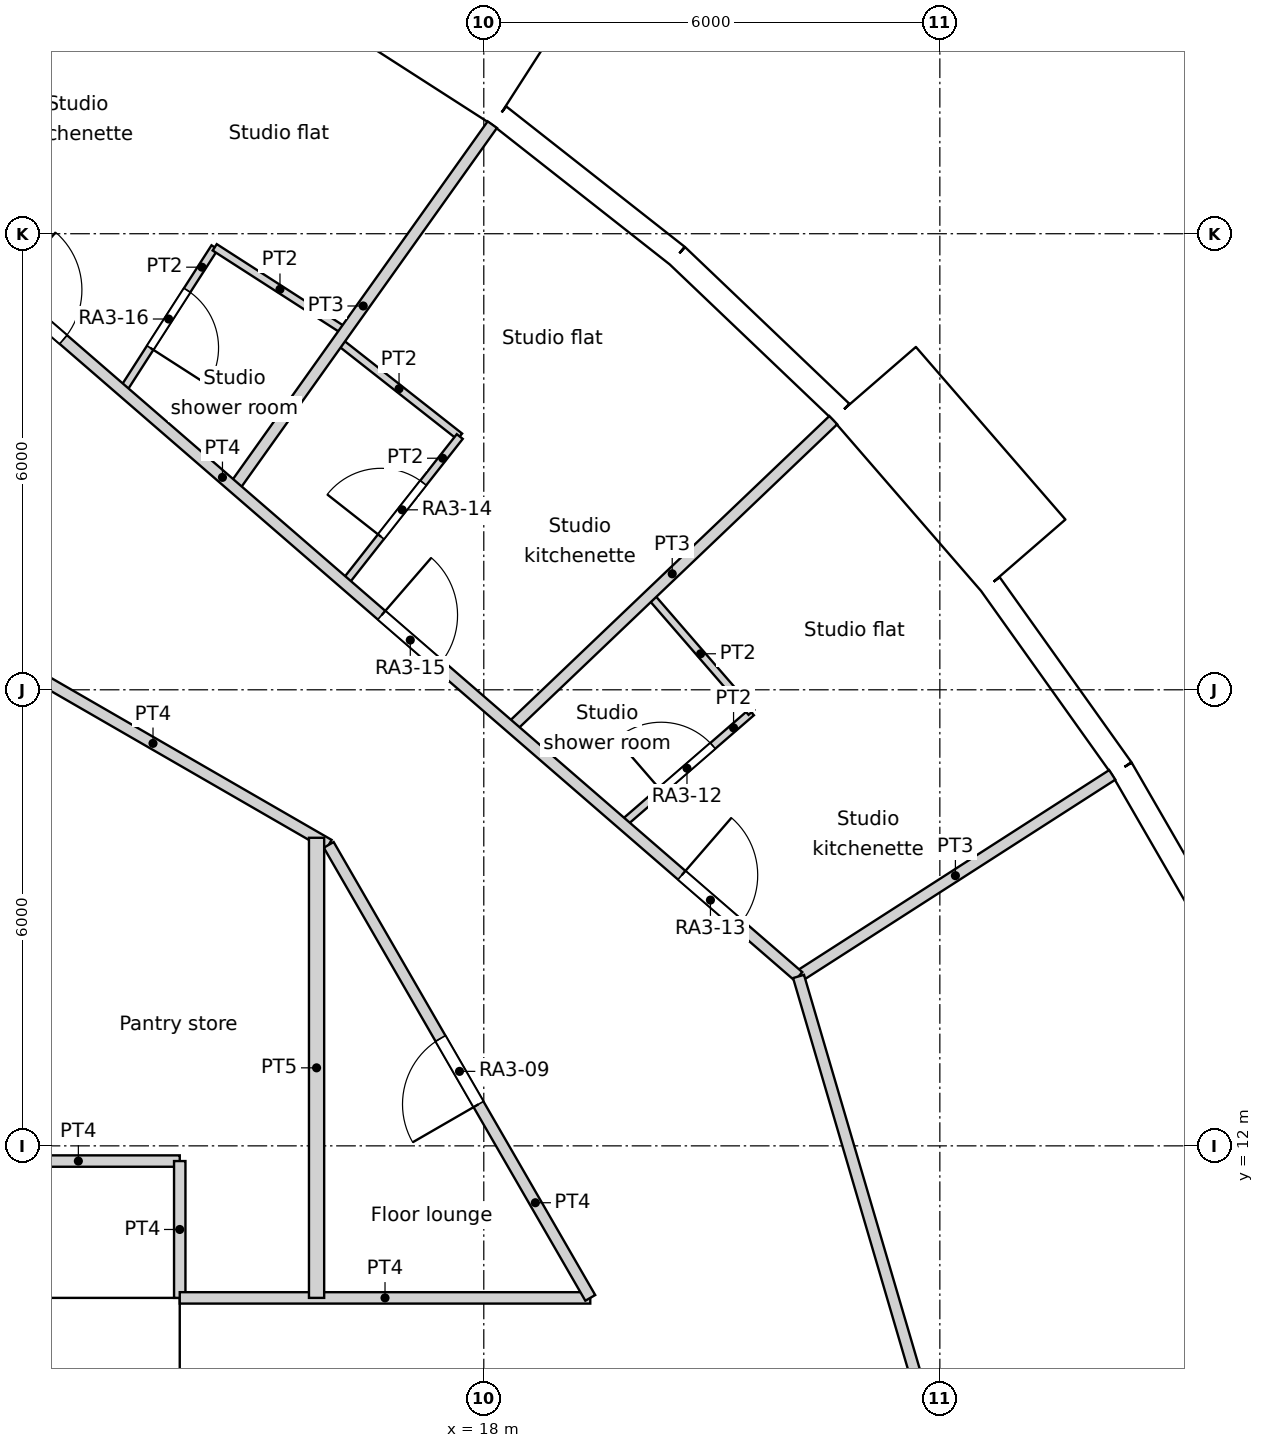
"""IFC4 building model, lengths in metres.
Left out: names, types, materials, properties, quantities, classifications, styles, units other than length and angle.
Written with IfcOpenShell. Run it as: python <this file> out.ifc"""

import sys

from ifc_helpers import new_model, si_unit, direction, frame, frame_2d, origin, origin_2d, place, context, subcontext, project, spatial, rectangle, circle, extrude, element, fill, save


model = new_model("IFC4")
c1 = context("Model", 3, precision=1e-05, world=origin(), true_north=direction((0.0, 1.0)))
c2 = subcontext(c1, "Body", "Model", "MODEL_VIEW")
j1 = project(units=[si_unit("LENGTHUNIT", "METRE"), si_unit("PLANEANGLEUNIT", "RADIAN")], contexts=[c1])
p1 = place(None, origin())
s1 = spatial("IfcSite", under=j1, at=p1, CompositionType="ELEMENT")
p2 = place(p1, origin())
s2 = spatial("IfcBuilding", under=s1, at=p2, CompositionType="ELEMENT")
p3 = place(p2, frame((0.0, 0.0, 49.8)))
s3 = spatial("IfcBuildingStorey", under=s2, at=p3, CompositionType="ELEMENT", Elevation=49.8)
for number, where, z_axis, x_axis in (
    (1, (25.469, 16.368, 0.0), (0.0, 0.0, 1.0), (1.0, 0.0, 0.0)),
    (2, (21.911, 20.892, 0.0), (0.0, 0.0, 1.0), (1.0, 0.0, 0.0)),
    (3, (17.561, 24.661, 0.0), (0.0, 0.0, 1.0), (1.0, 0.0, 0.0)),
):
    element("IfcColumn", number, at=place(p3, frame(where, z_axis=z_axis, x_axis=x_axis)), inside=s3, PredefinedType="COLUMN", context=c2, shape_type="SweptSolid", body=[
        extrude(circle(Radius=0.7, at=origin_2d()), origin(), (0.0, 0.0, 1.0), 3.6),
    ])
for number, where, z_axis, x_axis in (
    (4, (21.937, 11.017, 0.0), (0.0, 0.0, 1.0), (1.0, 0.0, 0.0)),
    (5, (18.805, 15.779, 0.0), (0.0, 0.0, 1.0), (1.0, 0.0, 0.0)),
    (6, (14.659, 19.69, 0.0), (0.0, 0.0, 1.0), (1.0, 0.0, 0.0)),
):
    element("IfcColumn", number, at=place(p3, frame(where, z_axis=z_axis, x_axis=x_axis)), inside=s3, PredefinedType="COLUMN", context=c2, shape_type="SweptSolid", body=[
        extrude(circle(Radius=0.75, at=origin_2d()), origin(), (0.0, 0.0, 1.0), 3.6),
    ])
for number, where, z_axis, x_axis in (
    (7, (15.552, 10.603, 0.0), (0.0, 0.0, 1.0), (1.0, 0.0, 0.0)),
    (8, (11.735, 14.716, 0.0), (0.0, 0.0, 1.0), (1.0, 0.0, 0.0)),
):
    element("IfcColumn", number, at=place(p3, frame(where, z_axis=z_axis, x_axis=x_axis)), inside=s3, PredefinedType="COLUMN", context=c2, shape_type="SweptSolid", body=[
        extrude(circle(Radius=0.8, at=origin_2d()), origin(), (0.0, 0.0, 1.0), 3.6),
    ])
p4 = place(p3, frame((27.884, 14.382, 0.0), z_axis=(0.0, 0.0, 1.0), x_axis=(-0.500025049464, 0.866010940986, 0.0)))
e9 = element("IfcWall", 9, at=p4, inside=s3, PredefinedType="SOLIDWALL", context=c2, shape_type="SweptSolid", body=[
    extrude(rectangle(XDim=2.98, YDim=0.3, at=frame_2d((1.49, 0.0))), origin(), (0.0, 0.0, 1.0), 3.15),
])
p5 = place(p4, frame((1.49, 0.0, 1.55)))
e10 = element("IfcOpeningElement", 10, at=p5, cuts=e9, PredefinedType="OPENING", context=c2, shape_type="SweptSolid", body=[
    extrude(circle(Radius=0.9, at=origin_2d()), frame((0.0, 0.16, 0.0), z_axis=(0.0, -1.0, 0.0), x_axis=(1.0, 0.0, 0.0)), (0.0, 0.0, 1.0), 0.32),
])
p6 = place(p3, frame((26.394, 16.962, 0.0), z_axis=(0.0, 0.0, 1.0), x_axis=(-0.580059407678, 0.81457417315, 0.0)))
e11 = element("IfcWall", 11, at=p6, inside=s3, PredefinedType="SOLIDWALL", context=c2, shape_type="SweptSolid", body=[
    extrude(rectangle(XDim=2.979, YDim=0.3, at=frame_2d((1.49, 0.0))), origin(), (0.0, 0.0, 1.0), 3.15),
])
p7 = place(p6, frame((1.49, 0.0, 1.55)))
e12 = element("IfcOpeningElement", 12, at=p7, cuts=e11, PredefinedType="OPENING", context=c2, shape_type="SweptSolid", body=[
    extrude(circle(Radius=0.9, at=origin_2d()), frame((0.0, 0.16, 0.0), z_axis=(0.0, -1.0, 0.0), x_axis=(1.0, 0.0, 0.0)), (0.0, 0.0, 1.0), 0.32),
])
p8 = place(p3, frame((25.101, 19.766, -0.45), z_axis=(0.0, 0.0, 1.0), x_axis=(-0.654890259022, 0.75572398972, 0.0)))
e13 = element("IfcWall", 13, at=p8, inside=s3, PredefinedType="ELEMENTEDWALL", context=c2, shape_type="SweptSolid", body=[
    extrude(rectangle(XDim=3.0, YDim=1.45, at=frame_2d((1.5, 0.0))), origin(), (0.0, 0.0, 1.0), 3.6),
])
p9 = place(p8, frame((1.5, 0.0, 2.0)))
e14 = element("IfcOpeningElement", 14, at=p9, cuts=e13, PredefinedType="OPENING", context=c2, shape_type="SweptSolid", body=[
    extrude(circle(Radius=0.9, at=origin_2d()), frame((0.0, 0.735, 0.0), z_axis=(0.0, -1.0, 0.0), x_axis=(1.0, 0.0, 0.0)), (0.0, 0.0, 1.0), 1.47),
])
p10 = place(p3, frame((22.702, 21.655, 0.0), z_axis=(0.0, 0.0, 1.0), x_axis=(-0.723744206617, 0.690068346896, 0.0)))
e15 = element("IfcWall", 15, at=p10, inside=s3, PredefinedType="SOLIDWALL", context=c2, shape_type="SweptSolid", body=[
    extrude(rectangle(XDim=2.98, YDim=0.3, at=frame_2d((1.49, 0.0))), origin(), (0.0, 0.0, 1.0), 3.15),
])
p11 = place(p10, frame((1.49, 0.0, 1.55)))
e16 = element("IfcOpeningElement", 16, at=p11, cuts=e15, PredefinedType="OPENING", context=c2, shape_type="SweptSolid", body=[
    extrude(circle(Radius=0.9, at=origin_2d()), frame((0.0, 0.16, 0.0), z_axis=(0.0, -1.0, 0.0), x_axis=(1.0, 0.0, 0.0)), (0.0, 0.0, 1.0), 0.32),
])
p12 = place(p3, frame((20.546, 23.711, 0.0), z_axis=(0.0, 0.0, 1.0), x_axis=(-0.786045331304, 0.618168858108, 0.0)))
e17 = element("IfcWall", 17, at=p12, inside=s3, PredefinedType="SOLIDWALL", context=c2, shape_type="SweptSolid", body=[
    extrude(rectangle(XDim=2.98, YDim=0.3, at=frame_2d((1.49, 0.0))), origin(), (0.0, 0.0, 1.0), 3.15),
])
p13 = place(p12, frame((1.49, 0.0, 1.55)))
e18 = element("IfcOpeningElement", 18, at=p13, cuts=e17, PredefinedType="OPENING", context=c2, shape_type="SweptSolid", body=[
    extrude(circle(Radius=0.9, at=origin_2d()), frame((0.0, 0.16, 0.0), z_axis=(0.0, -1.0, 0.0), x_axis=(1.0, 0.0, 0.0)), (0.0, 0.0, 1.0), 0.32),
])
p14 = place(p3, frame((18.516, 26.037, -0.45), z_axis=(0.0, 0.0, 1.0), x_axis=(-0.841223422347, 0.540687667415, 0.0)))
e19 = element("IfcWall", 19, at=p14, inside=s3, PredefinedType="ELEMENTEDWALL", context=c2, shape_type="SweptSolid", body=[
    extrude(rectangle(XDim=3.0, YDim=1.45, at=frame_2d((1.5, 0.0))), origin(), (0.0, 0.0, 1.0), 3.6),
])
p15 = place(p14, frame((1.5, 0.0, 2.0)))
e20 = element("IfcOpeningElement", 20, at=p15, cuts=e19, PredefinedType="OPENING", context=c2, shape_type="SweptSolid", body=[
    extrude(circle(Radius=0.9, at=origin_2d()), frame((0.0, 0.735, 0.0), z_axis=(0.0, -1.0, 0.0), x_axis=(1.0, 0.0, 0.0)), (0.0, 0.0, 1.0), 1.47),
])
p16 = place(p3, frame((-14.0, 9.4, 0.0), z_axis=(0.0, 0.0, 1.0), x_axis=(1.0, 0.0, 0.0)))
e21 = element("IfcWall", 21, at=p16, inside=s3, PredefinedType="SOLIDWALL", context=c2, shape_type="SweptSolid", body=[
    extrude(rectangle(XDim=28.0, YDim=1.2, at=frame_2d((14.0, 0.0))), origin(), (0.0, 0.0, 1.0), 3.6),
])
p17 = place(p16, frame((9.8, 0.0, 0.0)))
e22 = element("IfcOpeningElement", 22, at=p17, cuts=e21, PredefinedType="OPENING", context=c2, shape_type="SweptSolid", body=[
    extrude(rectangle(XDim=1.8, YDim=2.1, at=frame_2d((0.9, 1.05))), frame((0.0, 0.6, 0.0), z_axis=(0.0, -1.0, 0.0), x_axis=(1.0, 0.0, 0.0)), (0.0, 0.0, 1.0), 1.2),
])
p18 = place(p3, frame((11.332, 11.8, 0.0), z_axis=(0.0, 0.0, 1.0), x_axis=(1.0, 0.0, 0.0)))
e23 = element("IfcWall", 23, at=p18, inside=s3, PredefinedType="PARTITIONING", context=c2, shape_type="SweptSolid", body=[
    extrude(rectangle(XDim=2.668, YDim=0.15, at=frame_2d((1.334, 0.0))), origin(), (0.0, 0.0, 1.0), 3.15),
])
p19 = place(p3, frame((14.0, 10.0, 0.0), z_axis=(0.0, 0.0, 1.0), x_axis=(0.0, 1.0, 0.0)))
e24 = element("IfcWall", 24, at=p19, inside=s3, PredefinedType="PARTITIONING", context=c2, shape_type="SweptSolid", body=[
    extrude(rectangle(XDim=1.8, YDim=0.15, at=frame_2d((0.9, 0.0))), origin(), (0.0, 0.0, 1.0), 3.15),
])
p20 = place(p3, frame((14.0, 10.0, 0.0), z_axis=(0.0, 0.0, 1.0), x_axis=(1.0, 0.0, 0.0)))
e25 = element("IfcWall", 25, at=p20, inside=s3, PredefinedType="PARTITIONING", context=c2, shape_type="SweptSolid", body=[
    extrude(rectangle(XDim=5.401, YDim=0.15, at=frame_2d((2.7, 0.0))), origin(), (0.0, 0.0, 1.0), 3.15),
])
p21 = place(p3, frame((15.96, 15.96, 0.0), z_axis=(0.0, 0.0, 1.0), x_axis=(0.499992689227, -0.86602962462, 0.0)))
e26 = element("IfcWall", 26, at=p21, inside=s3, PredefinedType="PARTITIONING", context=c2, shape_type="SweptSolid", body=[
    extrude(rectangle(XDim=6.882, YDim=0.15, at=frame_2d((3.441, 0.0))), origin(), (0.0, 0.0, 1.0), 3.15),
])
p22 = place(p21, frame((2.941, 0.0, 0.0)))
e27 = element("IfcOpeningElement", 27, at=p22, cuts=e26, PredefinedType="OPENING", context=c2, shape_type="SweptSolid", body=[
    extrude(rectangle(XDim=1.0, YDim=2.04, at=frame_2d((0.5, 1.02))), frame((0.0, 0.075, 0.0), z_axis=(0.0, -1.0, 0.0), x_axis=(1.0, 0.0, 0.0)), (0.0, 0.0, 1.0), 0.15),
])
p23 = place(p3, frame((22.141, 14.229, 0.0), z_axis=(0.0, 0.0, 1.0), x_axis=(0.281730446162, -0.959493593363, 0.0)))
e28 = element("IfcWall", 28, at=p23, inside=s3, PredefinedType="PARTITIONING", context=c2, shape_type="SweptSolid", body=[
    extrude(rectangle(XDim=14.83, YDim=0.15, at=frame_2d((7.415, 0.0))), origin(), (0.0, 0.0, 1.0), 3.15),
])
p24 = place(p23, frame((5.715, 0.0, 0.0)))
e29 = element("IfcOpeningElement", 29, at=p24, cuts=e28, PredefinedType="OPENING", context=c2, shape_type="SweptSolid", body=[
    extrude(rectangle(XDim=1.8, YDim=2.1, at=frame_2d((0.9, 1.05))), frame((0.0, 0.075, 0.0), z_axis=(0.0, -1.0, 0.0), x_axis=(1.0, 0.0, 0.0)), (0.0, 0.0, 1.0), 0.15),
])
p25 = place(p3, frame((10.932, 23.939, 0.0), z_axis=(0.0, 0.0, 1.0), x_axis=(0.755838982892, -0.654757536757, 0.0)))
e30 = element("IfcWall", 30, at=p25, inside=s3, PredefinedType="PARTITIONING", context=c2, shape_type="SweptSolid", body=[
    extrude(rectangle(XDim=14.83, YDim=0.15, at=frame_2d((7.415, 0.0))), origin(), (0.0, 0.0, 1.0), 3.15),
])
p26 = place(p25, frame((12.796, 0.0, 0.0)))
e31 = element("IfcOpeningElement", 31, at=p26, cuts=e30, PredefinedType="OPENING", context=c2, shape_type="SweptSolid", body=[
    extrude(rectangle(XDim=1.0, YDim=2.1, at=frame_2d((0.5, 1.05))), frame((0.0, 0.075, 0.0), z_axis=(0.0, -1.0, 0.0), x_axis=(1.0, 0.0, 0.0)), (0.0, 0.0, 1.0), 0.15),
])
p27 = place(p25, frame((7.572, 0.0, 0.0)))
e32 = element("IfcOpeningElement", 32, at=p27, cuts=e30, PredefinedType="OPENING", context=c2, shape_type="SweptSolid", body=[
    extrude(rectangle(XDim=1.0, YDim=2.1, at=frame_2d((0.5, 1.05))), frame((0.0, 0.075, 0.0), z_axis=(0.0, -1.0, 0.0), x_axis=(1.0, 0.0, 0.0)), (0.0, 0.0, 1.0), 0.15),
])
p28 = place(p25, frame((1.033, 0.0, 0.0)))
e33 = element("IfcOpeningElement", 33, at=p28, cuts=e30, PredefinedType="OPENING", context=c2, shape_type="SweptSolid", body=[
    extrude(rectangle(XDim=1.0, YDim=2.1, at=frame_2d((0.5, 1.05))), frame((0.0, 0.075, 0.0), z_axis=(0.0, -1.0, 0.0), x_axis=(1.0, 0.0, 0.0)), (0.0, 0.0, 1.0), 0.15),
])
p29 = place(p3, frame((11.336, 18.63, 0.0), z_axis=(0.0, 0.0, 1.0), x_axis=(0.866056911224, -0.499945423543, 0.0)))
e34 = element("IfcWall", 34, at=p29, inside=s3, PredefinedType="PARTITIONING", context=c2, shape_type="SweptSolid", body=[
    extrude(rectangle(XDim=5.339, YDim=0.15, at=frame_2d((2.67, 0.0))), origin(), (0.0, 0.0, 1.0), 3.15),
])
p30 = place(p3, frame((15.8, 10.0, 0.0), z_axis=(0.0, 0.0, 1.0), x_axis=(0.0, 1.0, 0.0)))
e35 = element("IfcWall", 35, at=p30, inside=s3, PredefinedType="PARTITIONING", context=c2, shape_type="SweptSolid", body=[
    extrude(rectangle(XDim=6.053, YDim=0.2, at=frame_2d((3.026, 0.0))), origin(), (0.0, 0.0, 1.0), 3.15),
])
p31 = place(p3, frame((22.141, 14.229, 0.0), z_axis=(0.0, 0.0, 1.0), x_axis=(0.841325591791, 0.540528675093, 0.0)))
e36 = element("IfcWall", 36, at=p31, inside=s3, PredefinedType="PARTITIONING", context=c2, shape_type="SweptSolid", body=[
    extrude(rectangle(XDim=4.906, YDim=0.15, at=frame_2d((2.453, 0.0))), origin(), (0.0, 0.0, 1.0), 3.15),
])
p32 = place(p3, frame((19.826, 16.234, 0.0), z_axis=(0.0, 0.0, 1.0), x_axis=(0.755703447798, 0.654913963042, 0.0)))
e37 = element("IfcWall", 37, at=p32, inside=s3, PredefinedType="PARTITIONING", context=c2, shape_type="SweptSolid", body=[
    extrude(rectangle(XDim=2.243, YDim=0.1, at=frame_2d((1.122, 0.0))), origin(), (0.0, 0.0, 1.0), 3.15),
])
p33 = place(p32, frame((0.671, 0.0, 0.0)))
e38 = element("IfcOpeningElement", 38, at=p33, cuts=e37, PredefinedType="OPENING", context=c2, shape_type="SweptSolid", body=[
    extrude(rectangle(XDim=0.9, YDim=2.04, at=frame_2d((0.45, 1.02))), frame((0.0, 0.05, 0.0), z_axis=(0.0, -1.0, 0.0), x_axis=(1.0, 0.0, 0.0)), (0.0, 0.0, 1.0), 0.1),
])
p34 = place(p3, frame((20.184, 19.245, 0.0), z_axis=(0.0, 0.0, 1.0), x_axis=(0.655017058368, -0.755614090159, 0.0)))
e39 = element("IfcWall", 39, at=p34, inside=s3, PredefinedType="PARTITIONING", context=c2, shape_type="SweptSolid", body=[
    extrude(rectangle(XDim=2.041, YDim=0.1, at=frame_2d((1.021, 0.0))), origin(), (0.0, 0.0, 1.0), 3.15),
])
p35 = place(p3, frame((18.36, 17.505, 0.0), z_axis=(0.0, 0.0, 1.0), x_axis=(0.723605349213, 0.690213951315, 0.0)))
e40 = element("IfcWall", 40, at=p35, inside=s3, PredefinedType="PARTITIONING", context=c2, shape_type="SweptSolid", body=[
    extrude(rectangle(XDim=5.856, YDim=0.15, at=frame_2d((2.928, 0.0))), origin(), (0.0, 0.0, 1.0), 3.15),
])
p36 = place(p3, frame((16.168, 19.404, 0.0), z_axis=(0.0, 0.0, 1.0), x_axis=(0.618142414415, 0.786066126672, 0.0)))
e41 = element("IfcWall", 41, at=p36, inside=s3, PredefinedType="PARTITIONING", context=c2, shape_type="SweptSolid", body=[
    extrude(rectangle(XDim=2.453, YDim=0.1, at=frame_2d((1.226, 0.0))), origin(), (0.0, 0.0, 1.0), 3.15),
])
p37 = place(p36, frame((0.776, 0.0, 0.0)))
e42 = element("IfcOpeningElement", 42, at=p37, cuts=e41, PredefinedType="OPENING", context=c2, shape_type="SweptSolid", body=[
    extrude(rectangle(XDim=0.9, YDim=2.04, at=frame_2d((0.45, 1.02))), frame((0.0, 0.05, 0.0), z_axis=(0.0, -1.0, 0.0), x_axis=(1.0, 0.0, 0.0)), (0.0, 0.0, 1.0), 0.1),
])
p38 = place(p3, frame((16.086, 22.589, 0.0), z_axis=(0.0, 0.0, 1.0), x_axis=(0.785984904201, -0.618245687707, 0.0)))
e43 = element("IfcWall", 43, at=p38, inside=s3, PredefinedType="PARTITIONING", context=c2, shape_type="SweptSolid", body=[
    extrude(rectangle(XDim=2.033, YDim=0.1, at=frame_2d((1.017, 0.0))), origin(), (0.0, 0.0, 1.0), 3.15),
])
p39 = place(p3, frame((14.715, 20.664, 0.0), z_axis=(0.0, 0.0, 1.0), x_axis=(0.57995989616, 0.814645026282, 0.0)))
e44 = element("IfcWall", 44, at=p39, inside=s3, PredefinedType="PARTITIONING", context=c2, shape_type="SweptSolid", body=[
    extrude(rectangle(XDim=5.857, YDim=0.15, at=frame_2d((2.928, 0.0))), origin(), (0.0, 0.0, 1.0), 3.15),
])
p40 = place(p3, frame((14.46, 23.821, 0.0), z_axis=(0.0, 0.0, 1.0), x_axis=(0.841135728185, -0.540824081168, 0.0)))
e45 = element("IfcWall", 45, at=p40, inside=s3, PredefinedType="PARTITIONING", context=c2, shape_type="SweptSolid", body=[
    extrude(rectangle(XDim=2.041, YDim=0.1, at=frame_2d((1.021, 0.0))), origin(), (0.0, 0.0, 1.0), 3.15),
])
p41 = place(p3, frame((13.248, 21.935, 0.0), z_axis=(0.0, 0.0, 1.0), x_axis=(0.540597960994, 0.841281073464, 0.0)))
e46 = element("IfcWall", 46, at=p41, inside=s3, PredefinedType="PARTITIONING", context=c2, shape_type="SweptSolid", body=[
    extrude(rectangle(XDim=2.242, YDim=0.1, at=frame_2d((1.121, 0.0))), origin(), (0.0, 0.0, 1.0), 3.15),
])
p42 = place(p41, frame((0.671, 0.0, 0.0)))
e47 = element("IfcOpeningElement", 47, at=p42, cuts=e46, PredefinedType="OPENING", context=c2, shape_type="SweptSolid", body=[
    extrude(rectangle(XDim=0.9, YDim=2.04, at=frame_2d((0.45, 1.02))), frame((0.0, 0.05, 0.0), z_axis=(0.0, -1.0, 0.0), x_axis=(1.0, 0.0, 0.0)), (0.0, 0.0, 1.0), 0.1),
])
p43 = place(p3, frame((10.934, 23.939, 0.0), z_axis=(0.0, 0.0, 1.0), x_axis=(0.415144641481, 0.909755421336, 0.0)))
e48 = element("IfcWall", 48, at=p43, inside=s3, PredefinedType="PARTITIONING", context=c2, shape_type="SweptSolid", body=[
    extrude(rectangle(XDim=4.906, YDim=0.15, at=frame_2d((2.453, 0.0))), origin(), (0.0, 0.0, 1.0), 3.15),
])
p44 = place(p5, origin())
e49 = element("IfcWindow", 49, at=p44, inside=s3, PartitioningType="SINGLE_PANEL", PredefinedType="WINDOW", context=c2, shape_type="SweptSolid", body=[
    extrude(circle(Radius=0.9, at=origin_2d()), frame((0.0, 0.12, 0.0), z_axis=(0.0, -1.0, 0.0), x_axis=(1.0, 0.0, 0.0)), (0.0, 0.0, 1.0), 0.1),
])
fill(e10, e49)
p45 = place(p7, origin())
e50 = element("IfcWindow", 50, at=p45, inside=s3, PartitioningType="SINGLE_PANEL", PredefinedType="WINDOW", context=c2, shape_type="SweptSolid", body=[
    extrude(circle(Radius=0.9, at=origin_2d()), frame((0.0, 0.12, 0.0), z_axis=(0.0, -1.0, 0.0), x_axis=(1.0, 0.0, 0.0)), (0.0, 0.0, 1.0), 0.1),
])
fill(e12, e50)
p46 = place(p9, origin())
e51 = element("IfcWindow", 51, at=p46, inside=s3, PartitioningType="SINGLE_PANEL", PredefinedType="WINDOW", context=c2, shape_type="SweptSolid", body=[
    extrude(circle(Radius=0.9, at=origin_2d()), frame((0.0, 0.695, 0.0), z_axis=(0.0, -1.0, 0.0), x_axis=(1.0, 0.0, 0.0)), (0.0, 0.0, 1.0), 0.1),
])
fill(e14, e51)
p47 = place(p11, origin())
e52 = element("IfcWindow", 52, at=p47, inside=s3, PartitioningType="SINGLE_PANEL", PredefinedType="WINDOW", context=c2, shape_type="SweptSolid", body=[
    extrude(circle(Radius=0.9, at=origin_2d()), frame((0.0, 0.12, 0.0), z_axis=(0.0, -1.0, 0.0), x_axis=(1.0, 0.0, 0.0)), (0.0, 0.0, 1.0), 0.1),
])
fill(e16, e52)
p48 = place(p13, origin())
e53 = element("IfcWindow", 53, at=p48, inside=s3, PartitioningType="SINGLE_PANEL", PredefinedType="WINDOW", context=c2, shape_type="SweptSolid", body=[
    extrude(circle(Radius=0.9, at=origin_2d()), frame((0.0, 0.12, 0.0), z_axis=(0.0, -1.0, 0.0), x_axis=(1.0, 0.0, 0.0)), (0.0, 0.0, 1.0), 0.1),
])
fill(e18, e53)
p49 = place(p15, origin())
e54 = element("IfcWindow", 54, at=p49, inside=s3, PartitioningType="SINGLE_PANEL", PredefinedType="WINDOW", context=c2, shape_type="SweptSolid", body=[
    extrude(circle(Radius=0.9, at=origin_2d()), frame((0.0, 0.695, 0.0), z_axis=(0.0, -1.0, 0.0), x_axis=(1.0, 0.0, 0.0)), (0.0, 0.0, 1.0), 0.1),
])
fill(e20, e54)
p50 = place(p22, origin())
e55 = element("IfcDoor", 55, at=p50, inside=s3, OperationType="SINGLE_SWING_LEFT", PredefinedType="DOOR", context=c2, shape_type="SweptSolid", body=[
    extrude(rectangle(XDim=1.0, YDim=2.04, at=frame_2d((0.5, 1.02))), frame((0.0, 0.025, 0.0), z_axis=(0.0, -1.0, 0.0), x_axis=(1.0, 0.0, 0.0)), (0.0, 0.0, 1.0), 0.05),
])
fill(e27, e55)
p51 = place(p33, origin())
e56 = element("IfcDoor", 56, at=p51, inside=s3, OperationType="SINGLE_SWING_LEFT", PredefinedType="DOOR", context=c2, shape_type="SweptSolid", body=[
    extrude(rectangle(XDim=0.9, YDim=2.04, at=frame_2d((0.45, 1.02))), frame((0.0, 0.025, 0.0), z_axis=(0.0, -1.0, 0.0), x_axis=(1.0, 0.0, 0.0)), (0.0, 0.0, 1.0), 0.05),
])
fill(e38, e56)
p52 = place(p26, origin())
e57 = element("IfcDoor", 57, at=p52, inside=s3, OperationType="SINGLE_SWING_LEFT", PredefinedType="DOOR", context=c2, shape_type="SweptSolid", body=[
    extrude(rectangle(XDim=1.0, YDim=2.1, at=frame_2d((0.5, 1.05))), frame((0.0, 0.025, 0.0), z_axis=(0.0, -1.0, 0.0), x_axis=(1.0, 0.0, 0.0)), (0.0, 0.0, 1.0), 0.05),
])
fill(e31, e57)
p53 = place(p37, origin())
e58 = element("IfcDoor", 58, at=p53, inside=s3, OperationType="SINGLE_SWING_LEFT", PredefinedType="DOOR", context=c2, shape_type="SweptSolid", body=[
    extrude(rectangle(XDim=0.9, YDim=2.04, at=frame_2d((0.45, 1.02))), frame((0.0, 0.025, 0.0), z_axis=(0.0, -1.0, 0.0), x_axis=(1.0, 0.0, 0.0)), (0.0, 0.0, 1.0), 0.05),
])
fill(e42, e58)
p54 = place(p27, origin())
e59 = element("IfcDoor", 59, at=p54, inside=s3, OperationType="SINGLE_SWING_LEFT", PredefinedType="DOOR", context=c2, shape_type="SweptSolid", body=[
    extrude(rectangle(XDim=1.0, YDim=2.1, at=frame_2d((0.5, 1.05))), frame((0.0, 0.025, 0.0), z_axis=(0.0, -1.0, 0.0), x_axis=(1.0, 0.0, 0.0)), (0.0, 0.0, 1.0), 0.05),
])
fill(e32, e59)
p55 = place(p42, origin())
e60 = element("IfcDoor", 60, at=p55, inside=s3, OperationType="SINGLE_SWING_RIGHT", PredefinedType="DOOR", context=c2, shape_type="SweptSolid", body=[
    extrude(rectangle(XDim=0.9, YDim=2.04, at=frame_2d((0.45, 1.02))), frame((0.0, 0.025, 0.0), z_axis=(0.0, -1.0, 0.0), x_axis=(1.0, 0.0, 0.0)), (0.0, 0.0, 1.0), 0.05),
])
fill(e47, e60)
p56 = place(p28, origin())
e61 = element("IfcDoor", 61, at=p56, inside=s3, OperationType="SINGLE_SWING_LEFT", PredefinedType="DOOR", context=c2, shape_type="SweptSolid", body=[
    extrude(rectangle(XDim=1.0, YDim=2.1, at=frame_2d((0.5, 1.05))), frame((0.0, 0.025, 0.0), z_axis=(0.0, -1.0, 0.0), x_axis=(1.0, 0.0, 0.0)), (0.0, 0.0, 1.0), 0.05),
])
fill(e33, e61)
save(model, sys.argv[1])
